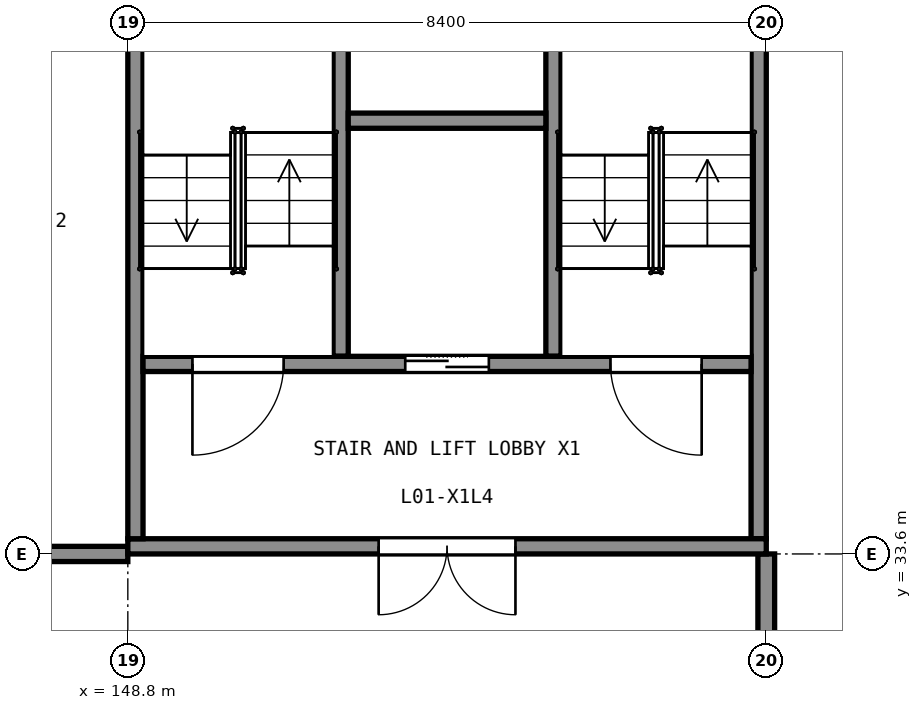
"""IFC4 building model, lengths in metres.
Left out: names, types, materials, properties, quantities, classifications, styles, units other than length and angle.
Written with IfcOpenShell. Run it as: python <this file> out.ifc"""

import sys

from ifc_helpers import new_model, si_unit, direction, frame, frame_2d, origin, place, context, subcontext, project, spatial, rectangle, extrude, element, fill, save


model = new_model("IFC4")
c1 = context("Model", 3, precision=1e-05, world=origin(), true_north=direction((0.0, 1.0)))
c2 = subcontext(c1, "Body", "Model", "MODEL_VIEW")
j1 = project(units=[si_unit("LENGTHUNIT", "METRE"), si_unit("PLANEANGLEUNIT", "RADIAN")], contexts=[c1])
p1 = place(None, origin())
s1 = spatial("IfcSite", under=j1, at=p1, CompositionType="ELEMENT")
p2 = place(p1, origin())
s2 = spatial("IfcBuilding", under=s1, at=p2, CompositionType="ELEMENT")
p3 = place(p2, frame((0.0, 0.0, 5.5)))
s3 = spatial("IfcBuildingStorey", under=s2, at=p3, CompositionType="ELEMENT", Elevation=5.5)
p4 = place(p3, frame((148.8, 33.7, 0.0), z_axis=(0.0, 0.0, 1.0), x_axis=(1.0, 0.0, 0.0)))
e1 = element("IfcWall", 1, at=p4, inside=s3, PredefinedType="SHEAR", context=c2, shape_type="SweptSolid", body=[
    extrude(rectangle(XDim=8.4, YDim=0.2, at=frame_2d((4.2, 0.0))), origin(), (0.0, 0.0, 1.0), 5.0),
])
p5 = place(p4, frame((3.3, 0.0, 0.0)))
e2 = element("IfcOpeningElement", 2, at=p5, cuts=e1, PredefinedType="OPENING", context=c2, shape_type="SweptSolid", body=[
    extrude(rectangle(XDim=1.8, YDim=2.1, at=frame_2d((0.9, 1.05))), frame((0.0, 0.11, 0.0), z_axis=(0.0, -1.0, 0.0), x_axis=(1.0, 0.0, 0.0)), (0.0, 0.0, 1.0), 0.22),
])
for number, where, z_axis, x_axis in (
    (3, (148.9, 33.8, 0.0), (0.0, 0.0, 1.0), (0.0, 1.0, 0.0)),
    (4, (157.1, 33.8, 0.0), (0.0, 0.0, 1.0), (0.0, 1.0, 0.0)),
):
    element("IfcWall", number, at=place(p3, frame(where, z_axis=z_axis, x_axis=x_axis)), inside=s3, PredefinedType="SHEAR", context=c2, shape_type="SweptSolid", body=[
        extrude(rectangle(XDim=8.0, YDim=0.2, at=frame_2d((4.0, 0.0))), origin(), (0.0, 0.0, 1.0), 5.0),
    ])
p6 = place(p3, frame((149.0, 36.1, 0.0), z_axis=(0.0, 0.0, 1.0), x_axis=(1.0, 0.0, 0.0)))
e5 = element("IfcWall", 5, at=p6, inside=s3, PredefinedType="SHEAR", context=c2, shape_type="SweptSolid", body=[
    extrude(rectangle(XDim=8.0, YDim=0.2, at=frame_2d((4.0, 0.0))), origin(), (0.0, 0.0, 1.0), 5.0),
])
p7 = place(p6, frame((0.65, 0.0, 0.0)))
e6 = element("IfcOpeningElement", 6, at=p7, cuts=e5, PredefinedType="OPENING", context=c2, shape_type="SweptSolid", body=[
    extrude(rectangle(XDim=1.2, YDim=2.1, at=frame_2d((0.6, 1.05))), frame((0.0, 0.11, 0.0), z_axis=(0.0, -1.0, 0.0), x_axis=(1.0, 0.0, 0.0)), (0.0, 0.0, 1.0), 0.22),
])
p8 = place(p6, frame((6.15, 0.0, 0.0)))
e7 = element("IfcOpeningElement", 7, at=p8, cuts=e5, PredefinedType="OPENING", context=c2, shape_type="SweptSolid", body=[
    extrude(rectangle(XDim=1.2, YDim=2.1, at=frame_2d((0.6, 1.05))), frame((0.0, 0.11, 0.0), z_axis=(0.0, -1.0, 0.0), x_axis=(1.0, 0.0, 0.0)), (0.0, 0.0, 1.0), 0.22),
])
p9 = place(p6, frame((3.45, 0.0, 0.0)))
e8 = element("IfcOpeningElement", 8, at=p9, cuts=e5, PredefinedType="OPENING", context=c2, shape_type="SweptSolid", body=[
    extrude(rectangle(XDim=1.1, YDim=2.1, at=frame_2d((0.55, 1.05))), frame((0.0, 0.11, 0.0), z_axis=(0.0, -1.0, 0.0), x_axis=(1.0, 0.0, 0.0)), (0.0, 0.0, 1.0), 0.22),
])
for number, where, z_axis, x_axis in (
    (9, (151.6, 36.2, 0.0), (0.0, 0.0, 1.0), (0.0, 1.0, 0.0)),
    (10, (154.4, 36.2, 0.0), (0.0, 0.0, 1.0), (0.0, 1.0, 0.0)),
):
    element("IfcWall", number, at=place(p3, frame(where, z_axis=z_axis, x_axis=x_axis)), inside=s3, PredefinedType="SHEAR", context=c2, shape_type="SweptSolid", body=[
        extrude(rectangle(XDim=5.6, YDim=0.2, at=frame_2d((2.8, 0.0))), origin(), (0.0, 0.0, 1.0), 5.0),
    ])
p10 = place(p3, frame((151.7, 39.3, 0.0), z_axis=(0.0, 0.0, 1.0), x_axis=(1.0, 0.0, 0.0)))
e11 = element("IfcWall", 11, at=p10, inside=s3, PredefinedType="SHEAR", context=c2, shape_type="SweptSolid", body=[
    extrude(rectangle(XDim=2.6, YDim=0.2, at=frame_2d((1.3, 0.0))), origin(), (0.0, 0.0, 1.0), 5.0),
])
p11 = place(p3, frame((157.2, 25.6, 0.0), z_axis=(0.0, 0.0, 1.0), x_axis=(0.0, 1.0, 0.0)))
e12 = element("IfcWall", 12, at=p11, inside=s3, PredefinedType="SOLIDWALL", context=c2, shape_type="SweptSolid", body=[
    extrude(rectangle(XDim=8.0, YDim=0.22, at=frame_2d((4.0, 0.0))), origin(), (0.0, 0.0, 1.0), 3.94),
])
p12 = place(p3, frame((144.5, 33.6, 0.0), z_axis=(0.0, 0.0, 1.0), x_axis=(1.0, 0.0, 0.0)))
e13 = element("IfcWall", 13, at=p12, inside=s3, PredefinedType="PARTITIONING", context=c2, shape_type="SweptSolid", body=[
    extrude(rectangle(XDim=4.3, YDim=0.2, at=frame_2d((2.15, 0.0))), origin(), (0.0, 0.0, 1.0), 3.9),
])
p13 = place(p12, frame((1.75, 0.0, 0.0)))
e14 = element("IfcOpeningElement", 14, at=p13, cuts=e13, PredefinedType="OPENING", context=c2, shape_type="SweptSolid", body=[
    extrude(rectangle(XDim=1.0, YDim=2.1, at=frame_2d((0.5, 1.05))), frame((0.0, 0.11, 0.0), z_axis=(0.0, -1.0, 0.0), x_axis=(1.0, 0.0, 0.0)), (0.0, 0.0, 1.0), 0.22),
])
p14 = place(p5, origin())
e15 = element("IfcDoor", 15, at=p14, inside=s3, OperationType="DOUBLE_DOOR_SINGLE_SWING", PredefinedType="DOOR", context=c2, shape_type="SweptSolid", body=[
    extrude(rectangle(XDim=1.8, YDim=2.1, at=frame_2d((0.9, 1.05))), frame((0.0, 0.025, 0.0), z_axis=(0.0, -1.0, 0.0), x_axis=(1.0, 0.0, 0.0)), (0.0, 0.0, 1.0), 0.05),
])
fill(e2, e15)
p15 = place(p7, origin())
e16 = element("IfcDoor", 16, at=p15, inside=s3, OperationType="SINGLE_SWING_LEFT", PredefinedType="DOOR", context=c2, shape_type="SweptSolid", body=[
    extrude(rectangle(XDim=1.2, YDim=2.1, at=frame_2d((0.6, 1.05))), frame((0.0, 0.025, 0.0), z_axis=(0.0, -1.0, 0.0), x_axis=(1.0, 0.0, 0.0)), (0.0, 0.0, 1.0), 0.05),
])
fill(e6, e16)
p16 = place(p8, origin())
e17 = element("IfcDoor", 17, at=p16, inside=s3, OperationType="SINGLE_SWING_RIGHT", PredefinedType="DOOR", context=c2, shape_type="SweptSolid", body=[
    extrude(rectangle(XDim=1.2, YDim=2.1, at=frame_2d((0.6, 1.05))), frame((0.0, 0.025, 0.0), z_axis=(0.0, -1.0, 0.0), x_axis=(1.0, 0.0, 0.0)), (0.0, 0.0, 1.0), 0.05),
])
fill(e7, e17)
p17 = place(p9, origin())
e18 = element("IfcDoor", 18, at=p17, inside=s3, OperationType="DOUBLE_DOOR_SLIDING", PredefinedType="DOOR", context=c2, shape_type="SweptSolid", body=[
    extrude(rectangle(XDim=1.1, YDim=2.1, at=frame_2d((0.55, 1.05))), frame((0.0, 0.025, 0.0), z_axis=(0.0, -1.0, 0.0), x_axis=(1.0, 0.0, 0.0)), (0.0, 0.0, 1.0), 0.05),
])
fill(e8, e18)
save(model, sys.argv[1])
